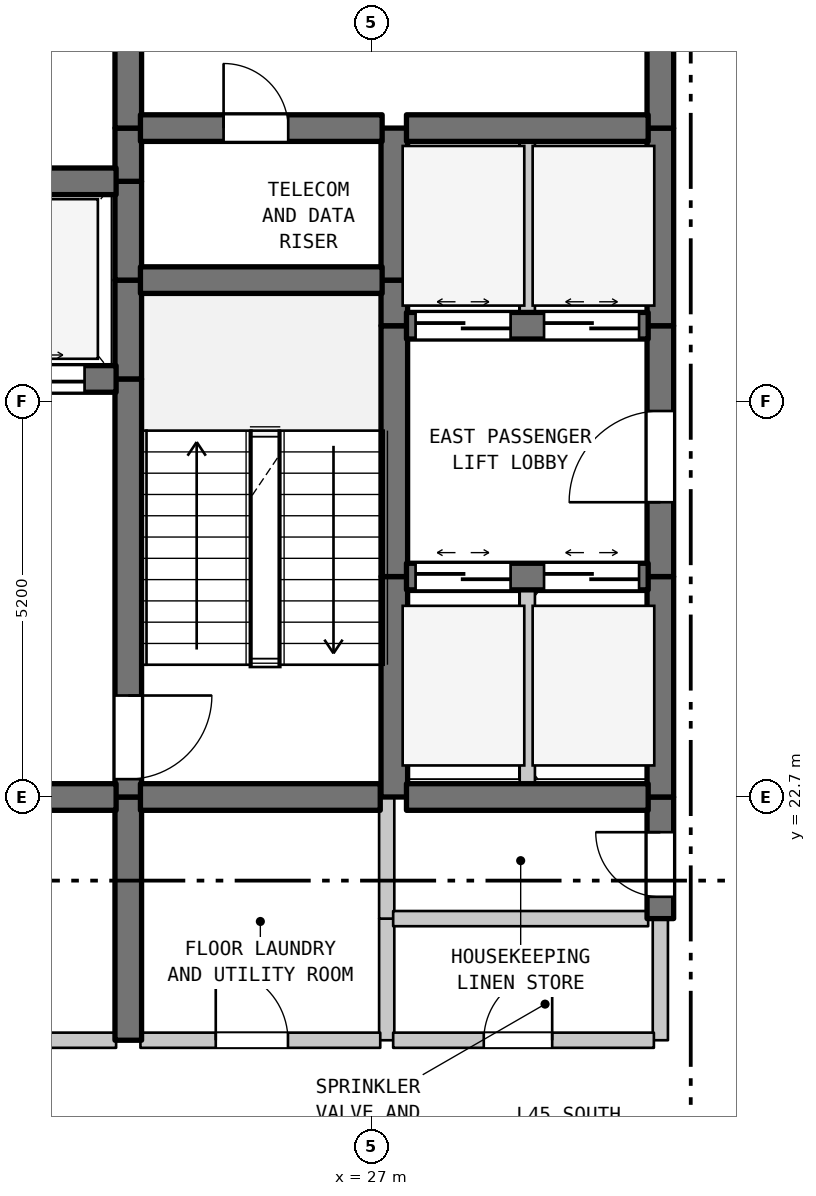
"""IFC4 building model, lengths in metres.
Left out: names, types, materials, properties, quantities, classifications, styles, units other than length and angle.
Written with IfcOpenShell. Run it as: python <this file> out.ifc"""

import sys

from ifc_helpers import new_model, si_unit, direction, frame, frame_2d, origin, place, context, subcontext, project, spatial, rectangle, extrude, element, fill, save


model = new_model("IFC4")
c1 = context("Model", 3, precision=1e-05, world=origin(), true_north=direction((0.0, 1.0)))
c2 = subcontext(c1, "Body", "Model", "MODEL_VIEW")
j1 = project(units=[si_unit("LENGTHUNIT", "METRE"), si_unit("PLANEANGLEUNIT", "RADIAN")], contexts=[c1])
p1 = place(None, origin())
s1 = spatial("IfcSite", under=j1, at=p1, CompositionType="ELEMENT")
p2 = place(p1, origin())
s2 = spatial("IfcBuilding", under=s1, at=p2, CompositionType="ELEMENT")
p3 = place(p2, frame((0.0, 0.0, 183.9)))
s3 = spatial("IfcBuildingStorey", under=s2, at=p3, CompositionType="ELEMENT", Elevation=183.9)
p4 = place(p3, frame((23.8, 19.5, 0.0), z_axis=(0.0, 0.0, 1.0), x_axis=(0.0, 1.0, 0.0)))
e1 = element("IfcWall", 1, at=p4, inside=s3, PredefinedType="SHEAR", context=c2, shape_type="SweptSolid", body=[
    extrude(rectangle(XDim=3.2, YDim=0.35, at=frame_2d((1.6, 0.0))), origin(), (0.0, 0.0, 1.0), 4.19),
])
p5 = place(p3, frame((23.8, 22.7, 0.0), z_axis=(0.0, 0.0, 1.0), x_axis=(0.0, 1.0, 0.0)))
e2 = element("IfcWall", 2, at=p5, inside=s3, PredefinedType="SHEAR", context=c2, shape_type="SweptSolid", body=[
    extrude(rectangle(XDim=5.5, YDim=0.35, at=frame_2d((2.75, 0.0))), origin(), (0.0, 0.0, 1.0), 4.19),
])
p6 = place(p5, frame((0.235, 0.0, 0.0)))
e3 = element("IfcOpeningElement", 3, at=p6, cuts=e2, PredefinedType="OPENING", context=c2, shape_type="SweptSolid", body=[
    extrude(rectangle(XDim=1.1, YDim=2.15, at=frame_2d((0.55, 1.075))), frame((0.0, 0.185, 0.0), z_axis=(0.0, -1.0, 0.0), x_axis=(1.0, 0.0, 0.0)), (0.0, 0.0, 1.0), 0.37),
])
for number, where, z_axis, x_axis in (
    (4, (23.8, 28.2, 0.0), (0.0, 0.0, 1.0), (0.0, 1.0, 0.0)),
    (5, (23.8, 29.5, 0.0), (0.0, 0.0, 1.0), (0.0, 1.0, 0.0)),
):
    element("IfcWall", number, at=place(p3, frame(where, z_axis=z_axis, x_axis=x_axis)), inside=s3, PredefinedType="SHEAR", context=c2, shape_type="SweptSolid", body=[
        extrude(rectangle(XDim=1.3, YDim=0.35, at=frame_2d((0.65, 0.0))), origin(), (0.0, 0.0, 1.0), 4.19),
    ])
p7 = place(p3, frame((23.8, 30.8, 0.0), z_axis=(0.0, 0.0, 1.0), x_axis=(0.0, 1.0, 0.0)))
e6 = element("IfcWall", 6, at=p7, inside=s3, PredefinedType="SHEAR", context=c2, shape_type="SweptSolid", body=[
    extrude(rectangle(XDim=0.7, YDim=0.35, at=frame_2d((0.35, 0.0))), origin(), (0.0, 0.0, 1.0), 4.19),
])
p8 = place(p3, frame((23.8, 31.5, 0.0), z_axis=(0.0, 0.0, 1.0), x_axis=(0.0, 1.0, 0.0)))
e7 = element("IfcWall", 7, at=p8, inside=s3, PredefinedType="SHEAR", context=c2, shape_type="SweptSolid", body=[
    extrude(rectangle(XDim=3.5, YDim=0.35, at=frame_2d((1.75, 0.0))), origin(), (0.0, 0.0, 1.0), 4.19),
])
p9 = place(p8, frame((1.127, 0.0, 0.0)))
e8 = element("IfcOpeningElement", 8, at=p9, cuts=e7, PredefinedType="OPENING", context=c2, shape_type="SweptSolid", body=[
    extrude(rectangle(XDim=1.1, YDim=2.15, at=frame_2d((0.55, 1.075))), frame((0.0, 0.185, 0.0), z_axis=(0.0, -1.0, 0.0), x_axis=(1.0, 0.0, 0.0)), (0.0, 0.0, 1.0), 0.37),
])
p10 = place(p3, frame((27.2, 19.5, 0.0), z_axis=(0.0, 0.0, 1.0), x_axis=(0.0, 1.0, 0.0)))
e9 = element("IfcWall", 9, at=p10, inside=s3, PredefinedType="STANDARD", context=c2, shape_type="SweptSolid", body=[
    extrude(rectangle(XDim=1.6, YDim=0.2, at=frame_2d((0.8, 0.0))), origin(), (0.0, 0.0, 1.0), 4.19),
])
p11 = place(p3, frame((27.2, 21.1, 0.0), z_axis=(0.0, 0.0, 1.0), x_axis=(0.0, 1.0, 0.0)))
e10 = element("IfcWall", 10, at=p11, inside=s3, PredefinedType="STANDARD", context=c2, shape_type="SweptSolid", body=[
    extrude(rectangle(XDim=1.6, YDim=0.2, at=frame_2d((0.8, 0.0))), origin(), (0.0, 0.0, 1.0), 4.19),
])
p12 = place(p3, frame((27.3, 22.7, 0.0), z_axis=(0.0, 0.0, 1.0), x_axis=(0.0, 1.0, 0.0)))
e11 = element("IfcWall", 11, at=p12, inside=s3, PredefinedType="SHEAR", context=c2, shape_type="SweptSolid", body=[
    extrude(rectangle(XDim=2.9, YDim=0.35, at=frame_2d((1.45, 0.0))), origin(), (0.0, 0.0, 1.0), 4.19),
])
p13 = place(p3, frame((27.3, 25.6, 0.0), z_axis=(0.0, 0.0, 1.0), x_axis=(0.0, 1.0, 0.0)))
e12 = element("IfcWall", 12, at=p13, inside=s3, PredefinedType="SHEAR", context=c2, shape_type="SweptSolid", body=[
    extrude(rectangle(XDim=3.3, YDim=0.35, at=frame_2d((1.65, 0.0))), origin(), (0.0, 0.0, 1.0), 4.19),
])
p14 = place(p3, frame((27.3, 28.9, 0.0), z_axis=(0.0, 0.0, 1.0), x_axis=(0.0, 1.0, 0.0)))
e13 = element("IfcWall", 13, at=p14, inside=s3, PredefinedType="SHEAR", context=c2, shape_type="SweptSolid", body=[
    extrude(rectangle(XDim=0.6, YDim=0.35, at=frame_2d((0.3, 0.0))), origin(), (0.0, 0.0, 1.0), 4.19),
])
p15 = place(p3, frame((27.3, 29.5, 0.0), z_axis=(0.0, 0.0, 1.0), x_axis=(0.0, 1.0, 0.0)))
e14 = element("IfcWall", 14, at=p15, inside=s3, PredefinedType="SHEAR", context=c2, shape_type="SweptSolid", body=[
    extrude(rectangle(XDim=2.0, YDim=0.35, at=frame_2d((1.0, 0.0))), origin(), (0.0, 0.0, 1.0), 4.19),
])
p16 = place(p3, frame((29.05, 22.7, 0.0), z_axis=(0.0, 0.0, 1.0), x_axis=(0.0, 1.0, 0.0)))
e15 = element("IfcWall", 15, at=p16, inside=s3, PredefinedType="STANDARD", context=c2, shape_type="SweptSolid", body=[
    extrude(rectangle(XDim=2.9, YDim=0.2, at=frame_2d((1.45, 0.0))), origin(), (0.0, 0.0, 1.0), 4.19),
])
p17 = place(p3, frame((29.05, 28.9, 0.0), z_axis=(0.0, 0.0, 1.0), x_axis=(0.0, 1.0, 0.0)))
e16 = element("IfcWall", 16, at=p17, inside=s3, PredefinedType="STANDARD", context=c2, shape_type="SweptSolid", body=[
    extrude(rectangle(XDim=2.6, YDim=0.2, at=frame_2d((1.3, 0.0))), origin(), (0.0, 0.0, 1.0), 4.19),
])
p18 = place(p3, frame((30.8, 19.5, 0.0), z_axis=(0.0, 0.0, 1.0), x_axis=(0.0, 1.0, 0.0)))
e17 = element("IfcWall", 17, at=p18, inside=s3, PredefinedType="STANDARD", context=c2, shape_type="SweptSolid", body=[
    extrude(rectangle(XDim=1.6, YDim=0.2, at=frame_2d((0.8, 0.0))), origin(), (0.0, 0.0, 1.0), 4.19),
])
p19 = place(p3, frame((30.8, 21.1, 0.0), z_axis=(0.0, 0.0, 1.0), x_axis=(0.0, 1.0, 0.0)))
e18 = element("IfcWall", 18, at=p19, inside=s3, PredefinedType="SHEAR", context=c2, shape_type="SweptSolid", body=[
    extrude(rectangle(XDim=1.6, YDim=0.35, at=frame_2d((0.8, 0.0))), origin(), (0.0, 0.0, 1.0), 4.19),
])
p20 = place(p19, frame((0.287, 0.0, 0.0)))
e19 = element("IfcOpeningElement", 19, at=p20, cuts=e18, PredefinedType="OPENING", context=c2, shape_type="SweptSolid", body=[
    extrude(rectangle(XDim=0.85, YDim=2.1, at=frame_2d((0.425, 1.05))), frame((0.0, 0.185, 0.0), z_axis=(0.0, -1.0, 0.0), x_axis=(1.0, 0.0, 0.0)), (0.0, 0.0, 1.0), 0.37),
])
p21 = place(p3, frame((30.8, 22.7, 0.0), z_axis=(0.0, 0.0, 1.0), x_axis=(0.0, 1.0, 0.0)))
e20 = element("IfcWall", 20, at=p21, inside=s3, PredefinedType="SHEAR", context=c2, shape_type="SweptSolid", body=[
    extrude(rectangle(XDim=2.9, YDim=0.35, at=frame_2d((1.45, 0.0))), origin(), (0.0, 0.0, 1.0), 4.19),
])
p22 = place(p3, frame((30.8, 25.6, 0.0), z_axis=(0.0, 0.0, 1.0), x_axis=(0.0, 1.0, 0.0)))
e21 = element("IfcWall", 21, at=p22, inside=s3, PredefinedType="SHEAR", context=c2, shape_type="SweptSolid", body=[
    extrude(rectangle(XDim=3.3, YDim=0.35, at=frame_2d((1.65, 0.0))), origin(), (0.0, 0.0, 1.0), 4.19),
])
p23 = place(p22, frame((0.978, 0.0, 0.0)))
e22 = element("IfcOpeningElement", 22, at=p23, cuts=e21, PredefinedType="OPENING", context=c2, shape_type="SweptSolid", body=[
    extrude(rectangle(XDim=1.2, YDim=2.2, at=frame_2d((0.6, 1.1))), frame((0.0, 0.185, 0.0), z_axis=(0.0, -1.0, 0.0), x_axis=(1.0, 0.0, 0.0)), (0.0, 0.0, 1.0), 0.37),
])
p24 = place(p3, frame((30.8, 28.9, 0.0), z_axis=(0.0, 0.0, 1.0), x_axis=(0.0, 1.0, 0.0)))
e23 = element("IfcWall", 23, at=p24, inside=s3, PredefinedType="SHEAR", context=c2, shape_type="SweptSolid", body=[
    extrude(rectangle(XDim=2.6, YDim=0.35, at=frame_2d((1.3, 0.0))), origin(), (0.0, 0.0, 1.0), 4.19),
])
p25 = place(p3, frame((30.8, 31.5, 0.0), z_axis=(0.0, 0.0, 1.0), x_axis=(0.0, 1.0, 0.0)))
e24 = element("IfcWall", 24, at=p25, inside=s3, PredefinedType="SHEAR", context=c2, shape_type="SweptSolid", body=[
    extrude(rectangle(XDim=3.5, YDim=0.35, at=frame_2d((1.75, 0.0))), origin(), (0.0, 0.0, 1.0), 4.19),
])
p26 = place(p25, frame((1.15, 0.0, 0.0)))
e25 = element("IfcOpeningElement", 25, at=p26, cuts=e24, PredefinedType="OPENING", context=c2, shape_type="SweptSolid", body=[
    extrude(rectangle(XDim=1.2, YDim=2.2, at=frame_2d((0.6, 1.1))), frame((0.0, 0.185, 0.0), z_axis=(0.0, -1.0, 0.0), x_axis=(1.0, 0.0, 0.0)), (0.0, 0.0, 1.0), 0.37),
])
p27 = place(p3, frame((19.16, 19.5, 0.0), z_axis=(0.0, 0.0, 1.0), x_axis=(1.0, 0.0, 0.0)))
e26 = element("IfcWall", 26, at=p27, inside=s3, PredefinedType="STANDARD", context=c2, shape_type="SweptSolid", body=[
    extrude(rectangle(XDim=4.48, YDim=0.2, at=frame_2d((2.24, 0.0))), origin(), (0.0, 0.0, 1.0), 4.19),
])
p28 = place(p27, frame((1.64, 0.0, 0.0)))
e27 = element("IfcOpeningElement", 27, at=p28, cuts=e26, PredefinedType="OPENING", context=c2, shape_type="SweptSolid", body=[
    extrude(rectangle(XDim=1.2, YDim=2.2, at=frame_2d((0.6, 1.1))), frame((0.0, 0.11, 0.0), z_axis=(0.0, -1.0, 0.0), x_axis=(1.0, 0.0, 0.0)), (0.0, 0.0, 1.0), 0.22),
])
p29 = place(p3, frame((23.96, 19.5, 0.0), z_axis=(0.0, 0.0, 1.0), x_axis=(1.0, 0.0, 0.0)))
e28 = element("IfcWall", 28, at=p29, inside=s3, PredefinedType="STANDARD", context=c2, shape_type="SweptSolid", body=[
    extrude(rectangle(XDim=3.155, YDim=0.2, at=frame_2d((1.578, 0.0))), origin(), (0.0, 0.0, 1.0), 4.19),
])
p30 = place(p29, frame((0.991, 0.0, 0.0)))
e29 = element("IfcOpeningElement", 29, at=p30, cuts=e28, PredefinedType="OPENING", context=c2, shape_type="SweptSolid", body=[
    extrude(rectangle(XDim=0.95, YDim=2.15, at=frame_2d((0.475, 1.075))), frame((0.0, 0.11, 0.0), z_axis=(0.0, -1.0, 0.0), x_axis=(1.0, 0.0, 0.0)), (0.0, 0.0, 1.0), 0.22),
])
p31 = place(p3, frame((27.285, 19.5, 0.0), z_axis=(0.0, 0.0, 1.0), x_axis=(1.0, 0.0, 0.0)))
e30 = element("IfcWall", 30, at=p31, inside=s3, PredefinedType="STANDARD", context=c2, shape_type="SweptSolid", body=[
    extrude(rectangle(XDim=3.43, YDim=0.2, at=frame_2d((1.715, 0.0))), origin(), (0.0, 0.0, 1.0), 4.19),
])
p32 = place(p31, frame((1.192, 0.0, 0.0)))
e31 = element("IfcOpeningElement", 31, at=p32, cuts=e30, PredefinedType="OPENING", context=c2, shape_type="SweptSolid", body=[
    extrude(rectangle(XDim=0.9, YDim=2.15, at=frame_2d((0.45, 1.075))), frame((0.0, 0.11, 0.0), z_axis=(0.0, -1.0, 0.0), x_axis=(1.0, 0.0, 0.0)), (0.0, 0.0, 1.0), 0.22),
])
p33 = place(p3, frame((27.285, 21.1, 0.0), z_axis=(0.0, 0.0, 1.0), x_axis=(1.0, 0.0, 0.0)))
e32 = element("IfcWall", 32, at=p33, inside=s3, PredefinedType="STANDARD", context=c2, shape_type="SweptSolid", body=[
    extrude(rectangle(XDim=3.355, YDim=0.2, at=frame_2d((1.677, 0.0))), origin(), (0.0, 0.0, 1.0), 4.19),
])
p34 = place(p3, frame((19.16, 22.7, 0.0), z_axis=(0.0, 0.0, 1.0), x_axis=(1.0, 0.0, 0.0)))
e33 = element("IfcWall", 33, at=p34, inside=s3, PredefinedType="SHEAR", context=c2, shape_type="SweptSolid", body=[
    extrude(rectangle(XDim=4.48, YDim=0.35, at=frame_2d((2.24, 0.0))), origin(), (0.0, 0.0, 1.0), 4.19),
])
p35 = place(p34, frame((1.64, 0.0, 0.0)))
e34 = element("IfcOpeningElement", 34, at=p35, cuts=e33, PredefinedType="OPENING", context=c2, shape_type="SweptSolid", body=[
    extrude(rectangle(XDim=1.2, YDim=2.2, at=frame_2d((0.6, 1.1))), frame((0.0, 0.185, 0.0), z_axis=(0.0, -1.0, 0.0), x_axis=(1.0, 0.0, 0.0)), (0.0, 0.0, 1.0), 0.37),
])
p36 = place(p3, frame((23.96, 22.7, 0.0), z_axis=(0.0, 0.0, 1.0), x_axis=(1.0, 0.0, 0.0)))
e35 = element("IfcWall", 35, at=p36, inside=s3, PredefinedType="SHEAR", context=c2, shape_type="SweptSolid", body=[
    extrude(rectangle(XDim=3.155, YDim=0.35, at=frame_2d((1.578, 0.0))), origin(), (0.0, 0.0, 1.0), 4.19),
])
p37 = place(p3, frame((27.46, 22.7, 0.0), z_axis=(0.0, 0.0, 1.0), x_axis=(1.0, 0.0, 0.0)))
e36 = element("IfcWall", 36, at=p37, inside=s3, PredefinedType="SHEAR", context=c2, shape_type="SweptSolid", body=[
    extrude(rectangle(XDim=3.18, YDim=0.35, at=frame_2d((1.59, 0.0))), origin(), (0.0, 0.0, 1.0), 4.19),
])
p38 = place(p3, frame((27.46, 25.6, 0.0), z_axis=(0.0, 0.0, 1.0), x_axis=(1.0, 0.0, 0.0)))
e37 = element("IfcWall", 37, at=p38, inside=s3, PredefinedType="SHEAR", context=c2, shape_type="SweptSolid", body=[
    extrude(rectangle(XDim=3.18, YDim=0.35, at=frame_2d((1.59, 0.0))), origin(), (0.0, 0.0, 1.0), 4.19),
])
p39 = place(p38, frame((0.12, 0.0, 0.0)))
e38 = element("IfcOpeningElement", 38, at=p39, cuts=e37, PredefinedType="OPENING", context=c2, shape_type="SweptSolid", body=[
    extrude(rectangle(XDim=1.25, YDim=2.2, at=frame_2d((0.625, 1.1))), frame((0.0, 0.185, 0.0), z_axis=(0.0, -1.0, 0.0), x_axis=(1.0, 0.0, 0.0)), (0.0, 0.0, 1.0), 0.37),
])
p40 = place(p38, frame((1.81, 0.0, 0.0)))
e39 = element("IfcOpeningElement", 39, at=p40, cuts=e37, PredefinedType="OPENING", context=c2, shape_type="SweptSolid", body=[
    extrude(rectangle(XDim=1.25, YDim=2.2, at=frame_2d((0.625, 1.1))), frame((0.0, 0.185, 0.0), z_axis=(0.0, -1.0, 0.0), x_axis=(1.0, 0.0, 0.0)), (0.0, 0.0, 1.0), 0.37),
])
p41 = place(p3, frame((19.16, 28.2, 0.0), z_axis=(0.0, 0.0, 1.0), x_axis=(1.0, 0.0, 0.0)))
e40 = element("IfcWall", 40, at=p41, inside=s3, PredefinedType="SHEAR", context=c2, shape_type="SweptSolid", body=[
    extrude(rectangle(XDim=4.48, YDim=0.35, at=frame_2d((2.24, 0.0))), origin(), (0.0, 0.0, 1.0), 4.19),
])
p42 = place(p41, frame((0.415, 0.0, 0.0)))
e41 = element("IfcOpeningElement", 41, at=p42, cuts=e40, PredefinedType="OPENING", context=c2, shape_type="SweptSolid", body=[
    extrude(rectangle(XDim=1.25, YDim=2.2, at=frame_2d((0.625, 1.1))), frame((0.0, 0.185, 0.0), z_axis=(0.0, -1.0, 0.0), x_axis=(1.0, 0.0, 0.0)), (0.0, 0.0, 1.0), 0.37),
])
p43 = place(p41, frame((2.815, 0.0, 0.0)))
e42 = element("IfcOpeningElement", 42, at=p43, cuts=e40, PredefinedType="OPENING", context=c2, shape_type="SweptSolid", body=[
    extrude(rectangle(XDim=1.25, YDim=2.2, at=frame_2d((0.625, 1.1))), frame((0.0, 0.185, 0.0), z_axis=(0.0, -1.0, 0.0), x_axis=(1.0, 0.0, 0.0)), (0.0, 0.0, 1.0), 0.37),
])
p44 = place(p3, frame((27.46, 28.9, 0.0), z_axis=(0.0, 0.0, 1.0), x_axis=(1.0, 0.0, 0.0)))
e43 = element("IfcWall", 43, at=p44, inside=s3, PredefinedType="SHEAR", context=c2, shape_type="SweptSolid", body=[
    extrude(rectangle(XDim=3.18, YDim=0.35, at=frame_2d((1.59, 0.0))), origin(), (0.0, 0.0, 1.0), 4.19),
])
p45 = place(p44, frame((0.12, 0.0, 0.0)))
e44 = element("IfcOpeningElement", 44, at=p45, cuts=e43, PredefinedType="OPENING", context=c2, shape_type="SweptSolid", body=[
    extrude(rectangle(XDim=1.25, YDim=2.2, at=frame_2d((0.625, 1.1))), frame((0.0, 0.185, 0.0), z_axis=(0.0, -1.0, 0.0), x_axis=(1.0, 0.0, 0.0)), (0.0, 0.0, 1.0), 0.37),
])
p46 = place(p44, frame((1.81, 0.0, 0.0)))
e45 = element("IfcOpeningElement", 45, at=p46, cuts=e43, PredefinedType="OPENING", context=c2, shape_type="SweptSolid", body=[
    extrude(rectangle(XDim=1.25, YDim=2.2, at=frame_2d((0.625, 1.1))), frame((0.0, 0.185, 0.0), z_axis=(0.0, -1.0, 0.0), x_axis=(1.0, 0.0, 0.0)), (0.0, 0.0, 1.0), 0.37),
])
p47 = place(p3, frame((23.96, 29.5, 0.0), z_axis=(0.0, 0.0, 1.0), x_axis=(1.0, 0.0, 0.0)))
e46 = element("IfcWall", 46, at=p47, inside=s3, PredefinedType="SHEAR", context=c2, shape_type="SweptSolid", body=[
    extrude(rectangle(XDim=3.18, YDim=0.35, at=frame_2d((1.59, 0.0))), origin(), (0.0, 0.0, 1.0), 4.19),
])
p48 = place(p3, frame((19.16, 30.8, 0.0), z_axis=(0.0, 0.0, 1.0), x_axis=(1.0, 0.0, 0.0)))
e47 = element("IfcWall", 47, at=p48, inside=s3, PredefinedType="SHEAR", context=c2, shape_type="SweptSolid", body=[
    extrude(rectangle(XDim=4.48, YDim=0.35, at=frame_2d((2.24, 0.0))), origin(), (0.0, 0.0, 1.0), 4.19),
])
p49 = place(p3, frame((23.96, 31.5, 0.0), z_axis=(0.0, 0.0, 1.0), x_axis=(1.0, 0.0, 0.0)))
e48 = element("IfcWall", 48, at=p49, inside=s3, PredefinedType="SHEAR", context=c2, shape_type="SweptSolid", body=[
    extrude(rectangle(XDim=3.18, YDim=0.35, at=frame_2d((1.59, 0.0))), origin(), (0.0, 0.0, 1.0), 4.19),
])
p50 = place(p49, frame((1.094, 0.0, 0.0)))
e49 = element("IfcOpeningElement", 49, at=p50, cuts=e48, PredefinedType="OPENING", context=c2, shape_type="SweptSolid", body=[
    extrude(rectangle(XDim=0.85, YDim=2.1, at=frame_2d((0.425, 1.05))), frame((0.0, 0.185, 0.0), z_axis=(0.0, -1.0, 0.0), x_axis=(1.0, 0.0, 0.0)), (0.0, 0.0, 1.0), 0.37),
])
p51 = place(p3, frame((27.46, 31.5, 0.0), z_axis=(0.0, 0.0, 1.0), x_axis=(1.0, 0.0, 0.0)))
e50 = element("IfcWall", 50, at=p51, inside=s3, PredefinedType="SHEAR", context=c2, shape_type="SweptSolid", body=[
    extrude(rectangle(XDim=3.18, YDim=0.35, at=frame_2d((1.59, 0.0))), origin(), (0.0, 0.0, 1.0), 4.19),
])
p52 = place(p6, frame((1.1, 0.0, 0.0), z_axis=(0.0, 0.0, 1.0), x_axis=(-1.0, 0.0, 0.0)))
e51 = element("IfcDoor", 51, at=p52, inside=s3, OperationType="SINGLE_SWING_RIGHT", PredefinedType="DOOR", context=c2, shape_type="SweptSolid", body=[
    extrude(rectangle(XDim=1.1, YDim=2.15, at=frame_2d((0.55, 1.075))), frame((0.0, 0.025, 0.0), z_axis=(0.0, -1.0, 0.0), x_axis=(1.0, 0.0, 0.0)), (0.0, 0.0, 1.0), 0.05),
])
fill(e3, e51)
p53 = place(p20, origin())
e52 = element("IfcDoor", 52, at=p53, inside=s3, OperationType="SINGLE_SWING_RIGHT", PredefinedType="DOOR", context=c2, shape_type="SweptSolid", body=[
    extrude(rectangle(XDim=0.85, YDim=2.1, at=frame_2d((0.425, 1.05))), frame((0.0, 0.025, 0.0), z_axis=(0.0, -1.0, 0.0), x_axis=(1.0, 0.0, 0.0)), (0.0, 0.0, 1.0), 0.05),
])
fill(e19, e52)
p54 = place(p23, origin())
e53 = element("IfcDoor", 53, at=p54, inside=s3, OperationType="SINGLE_SWING_LEFT", PredefinedType="DOOR", context=c2, shape_type="SweptSolid", body=[
    extrude(rectangle(XDim=1.2, YDim=2.2, at=frame_2d((0.6, 1.1))), frame((0.0, 0.025, 0.0), z_axis=(0.0, -1.0, 0.0), x_axis=(1.0, 0.0, 0.0)), (0.0, 0.0, 1.0), 0.05),
])
fill(e22, e53)
p55 = place(p30, origin())
e54 = element("IfcDoor", 54, at=p55, inside=s3, OperationType="SINGLE_SWING_LEFT", PredefinedType="DOOR", context=c2, shape_type="SweptSolid", body=[
    extrude(rectangle(XDim=0.95, YDim=2.15, at=frame_2d((0.475, 1.075))), frame((0.0, 0.025, 0.0), z_axis=(0.0, -1.0, 0.0), x_axis=(1.0, 0.0, 0.0)), (0.0, 0.0, 1.0), 0.05),
])
fill(e29, e54)
p56 = place(p32, origin())
e55 = element("IfcDoor", 55, at=p56, inside=s3, OperationType="SINGLE_SWING_RIGHT", PredefinedType="DOOR", context=c2, shape_type="SweptSolid", body=[
    extrude(rectangle(XDim=0.9, YDim=2.15, at=frame_2d((0.45, 1.075))), frame((0.0, 0.025, 0.0), z_axis=(0.0, -1.0, 0.0), x_axis=(1.0, 0.0, 0.0)), (0.0, 0.0, 1.0), 0.05),
])
fill(e31, e55)
p57 = place(p39, origin())
e56 = element("IfcDoor", 56, at=p57, inside=s3, OperationType="DOUBLE_DOOR_SLIDING", PredefinedType="DOOR", context=c2, shape_type="SweptSolid", body=[
    extrude(rectangle(XDim=1.25, YDim=2.2, at=frame_2d((0.625, 1.1))), frame((0.0, 0.025, 0.0), z_axis=(0.0, -1.0, 0.0), x_axis=(1.0, 0.0, 0.0)), (0.0, 0.0, 1.0), 0.05),
])
fill(e38, e56)
p58 = place(p40, origin())
e57 = element("IfcDoor", 57, at=p58, inside=s3, OperationType="DOUBLE_DOOR_SLIDING", PredefinedType="DOOR", context=c2, shape_type="SweptSolid", body=[
    extrude(rectangle(XDim=1.25, YDim=2.2, at=frame_2d((0.625, 1.1))), frame((0.0, 0.025, 0.0), z_axis=(0.0, -1.0, 0.0), x_axis=(1.0, 0.0, 0.0)), (0.0, 0.0, 1.0), 0.05),
])
fill(e39, e57)
p59 = place(p43, origin())
e58 = element("IfcDoor", 58, at=p59, inside=s3, OperationType="DOUBLE_DOOR_SLIDING", PredefinedType="DOOR", context=c2, shape_type="SweptSolid", body=[
    extrude(rectangle(XDim=1.25, YDim=2.2, at=frame_2d((0.625, 1.1))), frame((0.0, 0.025, 0.0), z_axis=(0.0, -1.0, 0.0), x_axis=(1.0, 0.0, 0.0)), (0.0, 0.0, 1.0), 0.05),
])
fill(e42, e58)
p60 = place(p45, origin())
e59 = element("IfcDoor", 59, at=p60, inside=s3, OperationType="DOUBLE_DOOR_SLIDING", PredefinedType="DOOR", context=c2, shape_type="SweptSolid", body=[
    extrude(rectangle(XDim=1.25, YDim=2.2, at=frame_2d((0.625, 1.1))), frame((0.0, 0.025, 0.0), z_axis=(0.0, -1.0, 0.0), x_axis=(1.0, 0.0, 0.0)), (0.0, 0.0, 1.0), 0.05),
])
fill(e44, e59)
p61 = place(p46, origin())
e60 = element("IfcDoor", 60, at=p61, inside=s3, OperationType="DOUBLE_DOOR_SLIDING", PredefinedType="DOOR", context=c2, shape_type="SweptSolid", body=[
    extrude(rectangle(XDim=1.25, YDim=2.2, at=frame_2d((0.625, 1.1))), frame((0.0, 0.025, 0.0), z_axis=(0.0, -1.0, 0.0), x_axis=(1.0, 0.0, 0.0)), (0.0, 0.0, 1.0), 0.05),
])
fill(e45, e60)
p62 = place(p50, origin())
e61 = element("IfcDoor", 61, at=p62, inside=s3, OperationType="SINGLE_SWING_LEFT", PredefinedType="DOOR", context=c2, shape_type="SweptSolid", body=[
    extrude(rectangle(XDim=0.85, YDim=2.1, at=frame_2d((0.425, 1.05))), frame((0.0, 0.025, 0.0), z_axis=(0.0, -1.0, 0.0), x_axis=(1.0, 0.0, 0.0)), (0.0, 0.0, 1.0), 0.05),
])
fill(e49, e61)
save(model, sys.argv[1])
